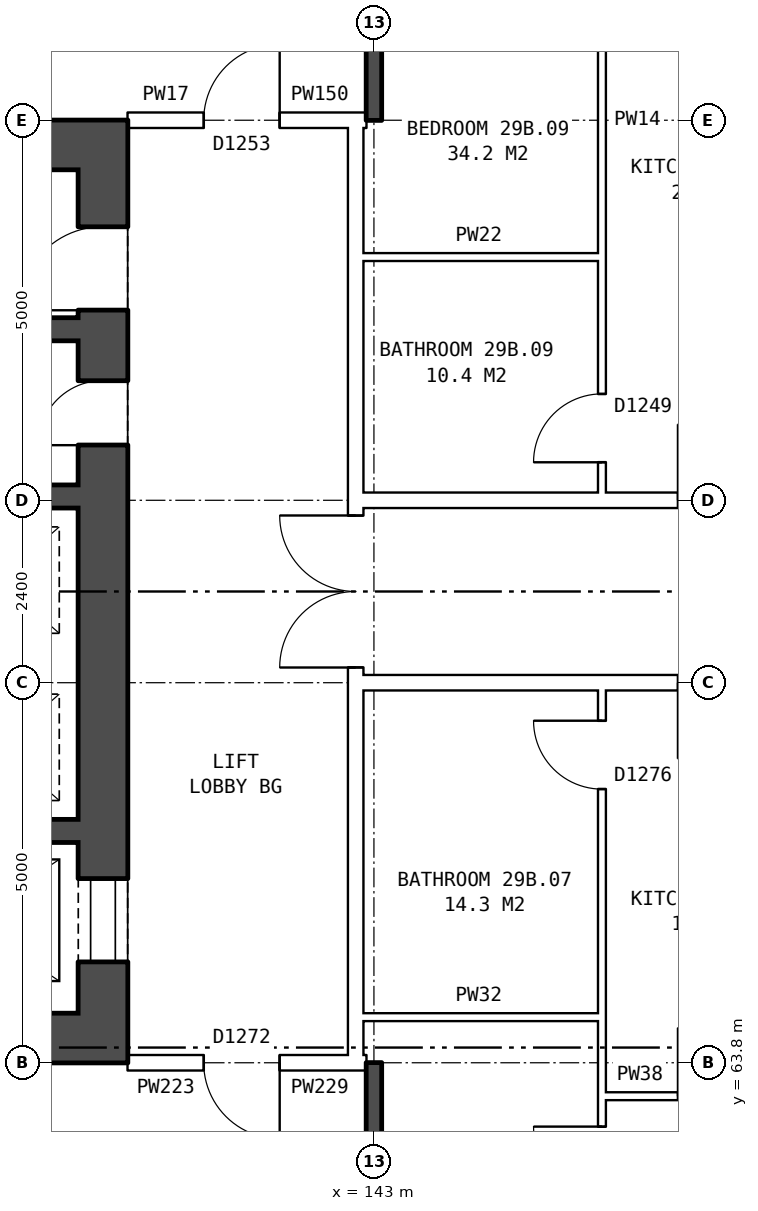
"""IFC4 building model, lengths in metres.
Left out: names, types, materials, properties, quantities, classifications, styles, units other than length and angle.
Written with IfcOpenShell. Run it as: python <this file> out.ifc"""

import sys

from ifc_helpers import new_model, si_unit, direction, frame, frame_2d, origin, place, context, subcontext, project, spatial, rectangle, extrude, element, fill, save


model = new_model("IFC4")
c1 = context("Model", 3, precision=1e-05, world=origin(), true_north=direction((0.0, 1.0)))
c2 = subcontext(c1, "Body", "Model", "MODEL_VIEW")
j1 = project(units=[si_unit("LENGTHUNIT", "METRE"), si_unit("PLANEANGLEUNIT", "RADIAN")], contexts=[c1])
p1 = place(None, origin())
s1 = spatial("IfcSite", under=j1, at=p1, CompositionType="ELEMENT")
p2 = place(p1, origin())
s2 = spatial("IfcBuilding", under=s1, at=p2, CompositionType="ELEMENT")
p3 = place(p2, frame((0.0, 0.0, 105.7)))
s3 = spatial("IfcBuildingStorey", under=s2, at=p3, CompositionType="ELEMENT", Elevation=105.7)
p4 = place(p3, frame((139.435, 64.45, 0.0), z_axis=(0.0, 0.0, 1.0), x_axis=(0.0, 1.0, 0.0)))
e1 = element("IfcWall", 1, at=p4, inside=s3, PredefinedType="SHEAR", context=c2, shape_type="SweptSolid", body=[
    extrude(rectangle(XDim=11.1, YDim=0.65, at=frame_2d((5.55, 0.0))), origin(), (0.0, 0.0, 1.0), 2.85),
])
p5 = place(p4, frame((0.675, 0.0, 0.0)))
e2 = element("IfcOpeningElement", 2, at=p5, cuts=e1, PredefinedType="OPENING", context=c2, shape_type="SweptSolid", body=[
    extrude(rectangle(XDim=1.1, YDim=2.1, at=frame_2d((0.55, 1.05))), frame((0.0, 0.335, 0.0), z_axis=(0.0, -1.0, 0.0), x_axis=(1.0, 0.0, 0.0)), (0.0, 0.0, 1.0), 0.67),
])
p6 = place(p4, frame((9.25, 0.0, 0.0)))
e3 = element("IfcOpeningElement", 3, at=p6, cuts=e1, PredefinedType="OPENING", context=c2, shape_type="SweptSolid", body=[
    extrude(rectangle(XDim=1.1, YDim=2.1, at=frame_2d((0.55, 1.05))), frame((0.0, 0.335, 0.0), z_axis=(0.0, -1.0, 0.0), x_axis=(1.0, 0.0, 0.0)), (0.0, 0.0, 1.0), 0.67),
])
p7 = place(p4, frame((7.475, 0.0, 0.0)))
e4 = element("IfcOpeningElement", 4, at=p7, cuts=e1, PredefinedType="OPENING", context=c2, shape_type="SweptSolid", body=[
    extrude(rectangle(XDim=0.85, YDim=2.1, at=frame_2d((0.425, 1.05))), frame((0.0, 0.335, 0.0), z_axis=(0.0, -1.0, 0.0), x_axis=(1.0, 0.0, 0.0)), (0.0, 0.0, 1.0), 0.67),
])
for number, where, z_axis, x_axis in (
    (5, (139.76, 64.125, 0.0), (0.0, 0.0, 1.0), (-1.0, 0.0, 0.0)),
    (6, (139.76, 75.875, 0.0), (0.0, 0.0, 1.0), (-1.0, 0.0, 0.0)),
):
    element("IfcWall", number, at=place(p3, frame(where, z_axis=z_axis, x_axis=x_axis)), inside=s3, PredefinedType="SHEAR", context=c2, shape_type="SweptSolid", body=[
        extrude(rectangle(XDim=8.4, YDim=0.65, at=frame_2d((4.2, 0.0))), origin(), (0.0, 0.0, 1.0), 2.85),
    ])
p8 = place(p3, frame((139.11, 66.85, 0.0), z_axis=(0.0, 0.0, 1.0), x_axis=(-1.0, 0.0, 0.0)))
e7 = element("IfcWall", 7, at=p8, inside=s3, PredefinedType="SHEAR", context=c2, shape_type="SweptSolid", body=[
    extrude(rectangle(XDim=4.25, YDim=0.3, at=frame_2d((2.125, 0.0))), origin(), (0.0, 0.0, 1.0), 2.85),
])
p9 = place(p3, frame((139.11, 71.25, 0.0), z_axis=(0.0, 0.0, 1.0), x_axis=(-1.0, 0.0, 0.0)))
e8 = element("IfcWall", 8, at=p9, inside=s3, PredefinedType="SHEAR", context=c2, shape_type="SweptSolid", body=[
    extrude(rectangle(XDim=7.1, YDim=0.3, at=frame_2d((3.55, 0.0))), origin(), (0.0, 0.0, 1.0), 2.85),
])
p10 = place(p9, frame((4.7, 0.0, 0.0)))
e9 = element("IfcOpeningElement", 9, at=p10, cuts=e8, PredefinedType="OPENING", context=c2, shape_type="SweptSolid", body=[
    extrude(rectangle(XDim=1.1, YDim=2.1, at=frame_2d((0.55, 1.05))), frame((0.0, 0.16, 0.0), z_axis=(0.0, -1.0, 0.0), x_axis=(1.0, 0.0, 0.0)), (0.0, 0.0, 1.0), 0.32),
])
p11 = place(p9, frame((2.975, 0.0, 0.0)))
e10 = element("IfcOpeningElement", 10, at=p11, cuts=e8, PredefinedType="OPENING", context=c2, shape_type="SweptSolid", body=[
    extrude(rectangle(XDim=0.85, YDim=2.1, at=frame_2d((0.425, 1.05))), frame((0.0, 0.16, 0.0), z_axis=(0.0, -1.0, 0.0), x_axis=(1.0, 0.0, 0.0)), (0.0, 0.0, 1.0), 0.32),
])
p12 = place(p3, frame((139.11, 73.45, 0.0), z_axis=(0.0, 0.0, 1.0), x_axis=(-1.0, 0.0, 0.0)))
e11 = element("IfcWall", 11, at=p12, inside=s3, PredefinedType="SHEAR", context=c2, shape_type="SweptSolid", body=[
    extrude(rectangle(XDim=2.25, YDim=0.3, at=frame_2d((1.125, 0.0))), origin(), (0.0, 0.0, 1.0), 2.85),
])
p13 = place(p3, frame((142.76, 63.9, 0.0), z_axis=(0.0, 0.0, 1.0), x_axis=(0.0, 1.0, 0.0)))
e12 = element("IfcWall", 12, at=p13, inside=s3, PredefinedType="PARTITIONING", context=c2, shape_type="SweptSolid", body=[
    extrude(rectangle(XDim=12.2, YDim=0.2, at=frame_2d((6.1, 0.0))), origin(), (0.0, 0.0, 1.0), 2.85),
])
p14 = place(p13, frame((5.1, 0.0, 0.0)))
e13 = element("IfcOpeningElement", 13, at=p14, cuts=e12, PredefinedType="OPENING", context=c2, shape_type="SweptSolid", body=[
    extrude(rectangle(XDim=2.0, YDim=2.1, at=frame_2d((1.0, 1.05))), frame((0.0, 0.11, 0.0), z_axis=(0.0, -1.0, 0.0), x_axis=(1.0, 0.0, 0.0)), (0.0, 0.0, 1.0), 0.22),
])
p15 = place(p3, frame((146.0, 63.36, 0.0), z_axis=(0.0, 0.0, 1.0), x_axis=(1.0, 0.0, 0.0)))
e14 = element("IfcWall", 14, at=p15, inside=s3, PredefinedType="PARTITIONING", context=c2, shape_type="SweptSolid", body=[
    extrude(rectangle(XDim=2.9, YDim=0.1, at=frame_2d((1.45, 0.0))), origin(), (0.0, 0.0, 1.0), 2.85),
])
p16 = place(p15, frame((1.0, 0.0, 0.0)))
e15 = element("IfcOpeningElement", 15, at=p16, cuts=e14, PredefinedType="OPENING", context=c2, shape_type="SweptSolid", body=[
    extrude(rectangle(XDim=0.9, YDim=2.1, at=frame_2d((0.45, 1.05))), frame((0.0, 0.06, 0.0), z_axis=(0.0, -1.0, 0.0), x_axis=(1.0, 0.0, 0.0)), (0.0, 0.0, 1.0), 0.12),
])
p17 = place(p3, frame((139.76, 63.8, 0.0), z_axis=(0.0, 0.0, 1.0), x_axis=(1.0, 0.0, 0.0)))
e16 = element("IfcWall", 16, at=p17, inside=s3, PredefinedType="PARTITIONING", context=c2, shape_type="SweptSolid", body=[
    extrude(rectangle(XDim=3.0, YDim=0.2, at=frame_2d((1.5, 0.0))), origin(), (0.0, 0.0, 1.0), 2.85),
])
p18 = place(p17, frame((1.0, 0.0, 0.0)))
e17 = element("IfcOpeningElement", 17, at=p18, cuts=e16, PredefinedType="OPENING", context=c2, shape_type="SweptSolid", body=[
    extrude(rectangle(XDim=1.0, YDim=2.1, at=frame_2d((0.5, 1.05))), frame((0.0, 0.11, 0.0), z_axis=(0.0, -1.0, 0.0), x_axis=(1.0, 0.0, 0.0)), (0.0, 0.0, 1.0), 0.22),
])
p19 = place(p3, frame((142.76, 63.8, 0.0), z_axis=(0.0, 0.0, 1.0), x_axis=(1.0, 0.0, 0.0)))
e18 = element("IfcWall", 18, at=p19, inside=s3, PredefinedType="PARTITIONING", context=c2, shape_type="SweptSolid", body=[
    extrude(rectangle(XDim=0.14, YDim=0.2, at=frame_2d((0.07, 0.0))), origin(), (0.0, 0.0, 1.0), 2.85),
])
p20 = place(p3, frame((142.76, 64.4, 0.0), z_axis=(0.0, 0.0, 1.0), x_axis=(1.0, 0.0, 0.0)))
e19 = element("IfcWall", 19, at=p20, inside=s3, PredefinedType="PARTITIONING", context=c2, shape_type="SweptSolid", body=[
    extrude(rectangle(XDim=3.24, YDim=0.1, at=frame_2d((1.62, 0.0))), origin(), (0.0, 0.0, 1.0), 2.85),
])
p21 = place(p3, frame((142.76, 68.8, 0.0), z_axis=(0.0, 0.0, 1.0), x_axis=(1.0, 0.0, 0.0)))
e20 = element("IfcWall", 20, at=p21, inside=s3, PredefinedType="PARTITIONING", context=c2, shape_type="SweptSolid", body=[
    extrude(rectangle(XDim=14.48, YDim=0.2, at=frame_2d((7.24, 0.0))), origin(), (0.0, 0.0, 1.0), 2.85),
])
p22 = place(p21, frame((4.24, 0.0, 0.0)))
e21 = element("IfcOpeningElement", 21, at=p22, cuts=e20, PredefinedType="OPENING", context=c2, shape_type="SweptSolid", body=[
    extrude(rectangle(XDim=1.0, YDim=2.1, at=frame_2d((0.5, 1.05))), frame((0.0, 0.11, 0.0), z_axis=(0.0, -1.0, 0.0), x_axis=(1.0, 0.0, 0.0)), (0.0, 0.0, 1.0), 0.22),
])
p23 = place(p21, frame((10.24, 0.0, 0.0)))
e22 = element("IfcOpeningElement", 22, at=p23, cuts=e20, PredefinedType="OPENING", context=c2, shape_type="SweptSolid", body=[
    extrude(rectangle(XDim=1.0, YDim=2.1, at=frame_2d((0.5, 1.05))), frame((0.0, 0.11, 0.0), z_axis=(0.0, -1.0, 0.0), x_axis=(1.0, 0.0, 0.0)), (0.0, 0.0, 1.0), 0.22),
])
p24 = place(p3, frame((142.76, 71.2, 0.0), z_axis=(0.0, 0.0, 1.0), x_axis=(1.0, 0.0, 0.0)))
e23 = element("IfcWall", 23, at=p24, inside=s3, PredefinedType="PARTITIONING", context=c2, shape_type="SweptSolid", body=[
    extrude(rectangle(XDim=14.48, YDim=0.2, at=frame_2d((7.24, 0.0))), origin(), (0.0, 0.0, 1.0), 2.85),
])
p25 = place(p24, frame((4.24, 0.0, 0.0)))
e24 = element("IfcOpeningElement", 24, at=p25, cuts=e23, PredefinedType="OPENING", context=c2, shape_type="SweptSolid", body=[
    extrude(rectangle(XDim=1.0, YDim=2.1, at=frame_2d((0.5, 1.05))), frame((0.0, 0.11, 0.0), z_axis=(0.0, -1.0, 0.0), x_axis=(1.0, 0.0, 0.0)), (0.0, 0.0, 1.0), 0.22),
])
p26 = place(p24, frame((10.24, 0.0, 0.0)))
e25 = element("IfcOpeningElement", 25, at=p26, cuts=e23, PredefinedType="OPENING", context=c2, shape_type="SweptSolid", body=[
    extrude(rectangle(XDim=1.0, YDim=2.1, at=frame_2d((0.5, 1.05))), frame((0.0, 0.11, 0.0), z_axis=(0.0, -1.0, 0.0), x_axis=(1.0, 0.0, 0.0)), (0.0, 0.0, 1.0), 0.22),
])
p27 = place(p3, frame((142.76, 74.4, 0.0), z_axis=(0.0, 0.0, 1.0), x_axis=(1.0, 0.0, 0.0)))
e26 = element("IfcWall", 26, at=p27, inside=s3, PredefinedType="PARTITIONING", context=c2, shape_type="SweptSolid", body=[
    extrude(rectangle(XDim=3.24, YDim=0.1, at=frame_2d((1.62, 0.0))), origin(), (0.0, 0.0, 1.0), 2.85),
])
p28 = place(p3, frame((139.76, 76.2, 0.0), z_axis=(0.0, 0.0, 1.0), x_axis=(1.0, 0.0, 0.0)))
e27 = element("IfcWall", 27, at=p28, inside=s3, PredefinedType="PARTITIONING", context=c2, shape_type="SweptSolid", body=[
    extrude(rectangle(XDim=3.0, YDim=0.2, at=frame_2d((1.5, 0.0))), origin(), (0.0, 0.0, 1.0), 2.85),
])
p29 = place(p28, frame((1.0, 0.0, 0.0)))
e28 = element("IfcOpeningElement", 28, at=p29, cuts=e27, PredefinedType="OPENING", context=c2, shape_type="SweptSolid", body=[
    extrude(rectangle(XDim=1.0, YDim=2.1, at=frame_2d((0.5, 1.05))), frame((0.0, 0.11, 0.0), z_axis=(0.0, -1.0, 0.0), x_axis=(1.0, 0.0, 0.0)), (0.0, 0.0, 1.0), 0.22),
])
p30 = place(p3, frame((142.76, 76.2, 0.0), z_axis=(0.0, 0.0, 1.0), x_axis=(1.0, 0.0, 0.0)))
e29 = element("IfcWall", 29, at=p30, inside=s3, PredefinedType="PARTITIONING", context=c2, shape_type="SweptSolid", body=[
    extrude(rectangle(XDim=0.14, YDim=0.2, at=frame_2d((0.07, 0.0))), origin(), (0.0, 0.0, 1.0), 2.85),
])
for number, where, z_axis, x_axis in (
    (30, (143.0, 54.36, 0.0), (0.0, 0.0, 1.0), (0.0, 1.0, 0.0)),
    (31, (143.0, 76.2, 0.0), (0.0, 0.0, 1.0), (0.0, 1.0, 0.0)),
):
    element("IfcWall", number, at=place(p3, frame(where, z_axis=z_axis, x_axis=x_axis)), inside=s3, PredefinedType="SOLIDWALL", context=c2, shape_type="SweptSolid", body=[
        extrude(rectangle(XDim=9.44, YDim=0.2, at=frame_2d((4.72, 0.0))), origin(), (0.0, 0.0, 1.0), 2.85),
    ])
p31 = place(p3, frame((146.0, 54.36, 0.0), z_axis=(0.0, 0.0, 1.0), x_axis=(0.0, 1.0, 0.0)))
e32 = element("IfcWall", 32, at=p31, inside=s3, PredefinedType="PARTITIONING", context=c2, shape_type="SweptSolid", body=[
    extrude(rectangle(XDim=14.34, YDim=0.1, at=frame_2d((7.17, 0.0))), origin(), (0.0, 0.0, 1.0), 2.85),
])
p32 = place(p31, frame((7.7, 0.0, 0.0)))
e33 = element("IfcOpeningElement", 33, at=p32, cuts=e32, PredefinedType="OPENING", context=c2, shape_type="SweptSolid", body=[
    extrude(rectangle(XDim=0.9, YDim=2.1, at=frame_2d((0.45, 1.05))), frame((0.0, 0.06, 0.0), z_axis=(0.0, -1.0, 0.0), x_axis=(1.0, 0.0, 0.0)), (0.0, 0.0, 1.0), 0.12),
])
p33 = place(p31, frame((13.04, 0.0, 0.0)))
e34 = element("IfcOpeningElement", 34, at=p33, cuts=e32, PredefinedType="OPENING", context=c2, shape_type="SweptSolid", body=[
    extrude(rectangle(XDim=0.9, YDim=2.1, at=frame_2d((0.45, 1.05))), frame((0.0, 0.06, 0.0), z_axis=(0.0, -1.0, 0.0), x_axis=(1.0, 0.0, 0.0)), (0.0, 0.0, 1.0), 0.12),
])
p34 = place(p3, frame((146.0, 71.3, 0.0), z_axis=(0.0, 0.0, 1.0), x_axis=(0.0, 1.0, 0.0)))
e35 = element("IfcWall", 35, at=p34, inside=s3, PredefinedType="PARTITIONING", context=c2, shape_type="SweptSolid", body=[
    extrude(rectangle(XDim=14.34, YDim=0.1, at=frame_2d((7.17, 0.0))), origin(), (0.0, 0.0, 1.0), 2.85),
])
p35 = place(p34, frame((7.94, 0.0, 0.0)))
e36 = element("IfcOpeningElement", 36, at=p35, cuts=e35, PredefinedType="OPENING", context=c2, shape_type="SweptSolid", body=[
    extrude(rectangle(XDim=0.9, YDim=2.1, at=frame_2d((0.45, 1.05))), frame((0.0, 0.06, 0.0), z_axis=(0.0, -1.0, 0.0), x_axis=(1.0, 0.0, 0.0)), (0.0, 0.0, 1.0), 0.12),
])
p36 = place(p34, frame((0.4, 0.0, 0.0)))
e37 = element("IfcOpeningElement", 37, at=p36, cuts=e35, PredefinedType="OPENING", context=c2, shape_type="SweptSolid", body=[
    extrude(rectangle(XDim=0.9, YDim=2.1, at=frame_2d((0.45, 1.05))), frame((0.0, 0.06, 0.0), z_axis=(0.0, -1.0, 0.0), x_axis=(1.0, 0.0, 0.0)), (0.0, 0.0, 1.0), 0.12),
])
p37 = place(p5, origin())
e38 = element("IfcDoor", 38, at=p37, inside=s3, OperationType="DOUBLE_DOOR_SLIDING", PredefinedType="DOOR", context=c2, shape_type="SweptSolid", body=[
    extrude(rectangle(XDim=1.1, YDim=2.1, at=frame_2d((0.55, 1.05))), frame((0.0, 0.31, 0.0), z_axis=(0.0, -1.0, 0.0), x_axis=(1.0, 0.0, 0.0)), (0.0, 0.0, 1.0), 0.05),
])
fill(e2, e38)
p38 = place(p6, origin())
e39 = element("IfcDoor", 39, at=p38, inside=s3, OperationType="SINGLE_SWING_LEFT", PredefinedType="DOOR", context=c2, shape_type="SweptSolid", body=[
    extrude(rectangle(XDim=1.1, YDim=2.1, at=frame_2d((0.55, 1.05))), frame((0.0, 0.31, 0.0), z_axis=(0.0, -1.0, 0.0), x_axis=(1.0, 0.0, 0.0)), (0.0, 0.0, 1.0), 0.05),
])
fill(e3, e39)
p39 = place(p7, origin())
e40 = element("IfcDoor", 40, at=p39, inside=s3, OperationType="SINGLE_SWING_LEFT", PredefinedType="DOOR", context=c2, shape_type="SweptSolid", body=[
    extrude(rectangle(XDim=0.85, YDim=2.1, at=frame_2d((0.425, 1.05))), frame((0.0, 0.31, 0.0), z_axis=(0.0, -1.0, 0.0), x_axis=(1.0, 0.0, 0.0)), (0.0, 0.0, 1.0), 0.05),
])
fill(e4, e40)
p40 = place(p14, origin())
e41 = element("IfcDoor", 41, at=p40, inside=s3, OperationType="DOUBLE_DOOR_SINGLE_SWING", PredefinedType="DOOR", context=c2, shape_type="SweptSolid", body=[
    extrude(rectangle(XDim=2.0, YDim=2.1, at=frame_2d((1.0, 1.05))), frame((0.0, 0.025, 0.0), z_axis=(0.0, -1.0, 0.0), x_axis=(1.0, 0.0, 0.0)), (0.0, 0.0, 1.0), 0.05),
])
fill(e13, e41)
p41 = place(p18, frame((1.0, 0.0, 0.0), z_axis=(0.0, 0.0, 1.0), x_axis=(-1.0, 0.0, 0.0)))
e42 = element("IfcDoor", 42, at=p41, inside=s3, OperationType="SINGLE_SWING_LEFT", PredefinedType="DOOR", context=c2, shape_type="SweptSolid", body=[
    extrude(rectangle(XDim=1.0, YDim=2.1, at=frame_2d((0.5, 1.05))), frame((0.0, 0.025, 0.0), z_axis=(0.0, -1.0, 0.0), x_axis=(1.0, 0.0, 0.0)), (0.0, 0.0, 1.0), 0.05),
])
fill(e17, e42)
p42 = place(p29, origin())
e43 = element("IfcDoor", 43, at=p42, inside=s3, OperationType="SINGLE_SWING_RIGHT", PredefinedType="DOOR", context=c2, shape_type="SweptSolid", body=[
    extrude(rectangle(XDim=1.0, YDim=2.1, at=frame_2d((0.5, 1.05))), frame((0.0, 0.025, 0.0), z_axis=(0.0, -1.0, 0.0), x_axis=(1.0, 0.0, 0.0)), (0.0, 0.0, 1.0), 0.05),
])
fill(e28, e43)
p43 = place(p32, origin())
e44 = element("IfcDoor", 44, at=p43, inside=s3, OperationType="SINGLE_SWING_RIGHT", PredefinedType="DOOR", context=c2, shape_type="SweptSolid", body=[
    extrude(rectangle(XDim=0.9, YDim=2.1, at=frame_2d((0.45, 1.05))), frame((0.0, 0.025, 0.0), z_axis=(0.0, -1.0, 0.0), x_axis=(1.0, 0.0, 0.0)), (0.0, 0.0, 1.0), 0.05),
])
fill(e33, e44)
p44 = place(p33, origin())
e45 = element("IfcDoor", 45, at=p44, inside=s3, OperationType="SINGLE_SWING_RIGHT", PredefinedType="DOOR", context=c2, shape_type="SweptSolid", body=[
    extrude(rectangle(XDim=0.9, YDim=2.1, at=frame_2d((0.45, 1.05))), frame((0.0, 0.025, 0.0), z_axis=(0.0, -1.0, 0.0), x_axis=(1.0, 0.0, 0.0)), (0.0, 0.0, 1.0), 0.05),
])
fill(e34, e45)
p45 = place(p36, origin())
e46 = element("IfcDoor", 46, at=p45, inside=s3, OperationType="SINGLE_SWING_LEFT", PredefinedType="DOOR", context=c2, shape_type="SweptSolid", body=[
    extrude(rectangle(XDim=0.9, YDim=2.1, at=frame_2d((0.45, 1.05))), frame((0.0, 0.025, 0.0), z_axis=(0.0, -1.0, 0.0), x_axis=(1.0, 0.0, 0.0)), (0.0, 0.0, 1.0), 0.05),
])
fill(e37, e46)
save(model, sys.argv[1])
